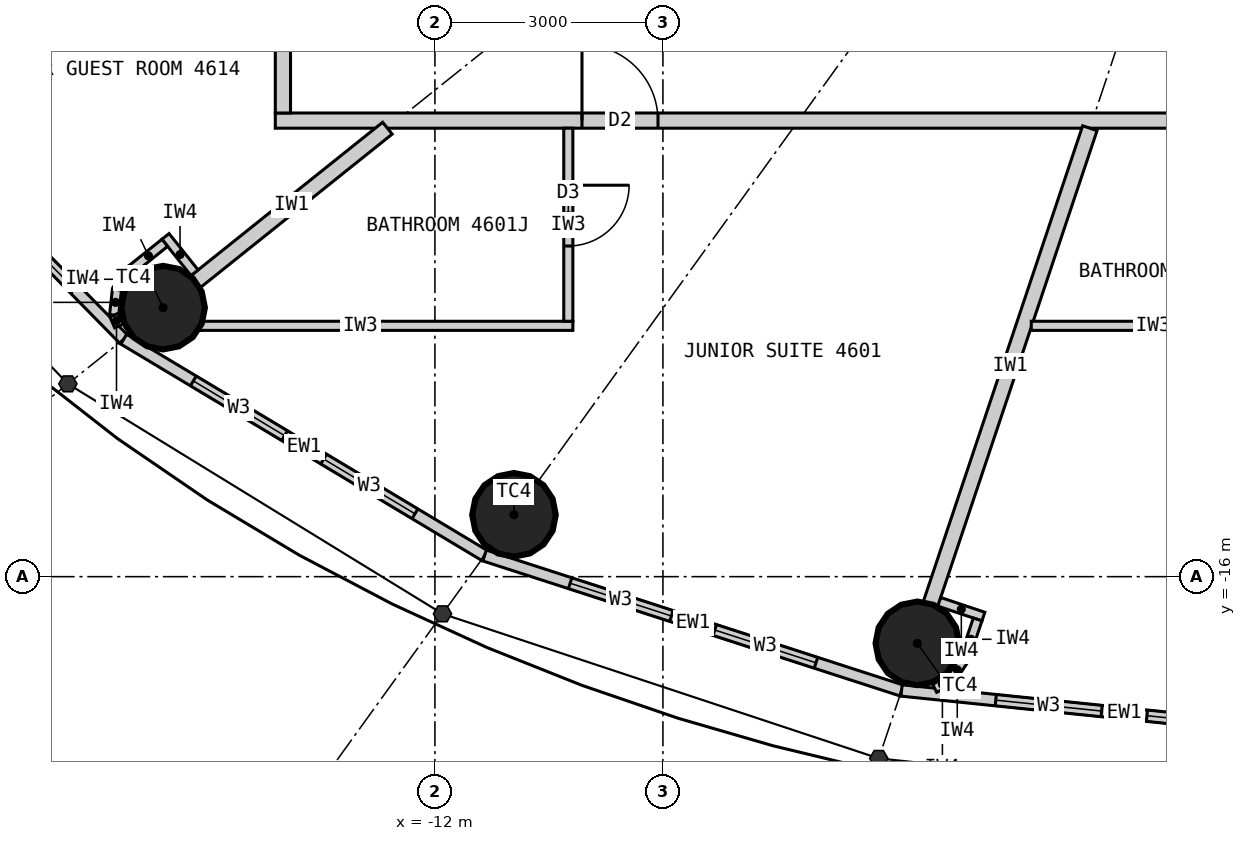
"""IFC4 building model, lengths in metres.
Left out: names, types, materials, properties, quantities, classifications, styles, units other than length and angle.
Written with IfcOpenShell. Run it as: python <this file> out.ifc"""

import sys

from ifc_helpers import new_model, si_unit, direction, frame, frame_2d, origin, origin_2d, place, context, subcontext, project, spatial, rectangle, circle, extrude, element, fill, save


model = new_model("IFC4")
c1 = context("Model", 3, precision=1e-05, world=origin(), true_north=direction((0.0, 1.0)))
c2 = subcontext(c1, "Body", "Model", "MODEL_VIEW")
j1 = project(units=[si_unit("LENGTHUNIT", "METRE"), si_unit("PLANEANGLEUNIT", "RADIAN")], contexts=[c1])
p1 = place(None, origin())
s1 = spatial("IfcSite", under=j1, at=p1, CompositionType="ELEMENT")
p2 = place(p1, origin())
s2 = spatial("IfcBuilding", under=s1, at=p2, CompositionType="ELEMENT")
p3 = place(p2, frame((0.0, 0.0, 173.1)))
s3 = spatial("IfcBuildingStorey", under=s2, at=p3, CompositionType="ELEMENT", Elevation=173.1)
for number, where, z_axis, x_axis in (
    (1, (-15.576, -12.461, 0.0), (0.0, 0.0, 1.0), (1.0, 0.0, 0.0)),
    (2, (-10.96, -15.186, 0.0), (0.0, 0.0, 1.0), (1.0, 0.0, 0.0)),
    (3, (-5.653, -16.877, 0.0), (0.0, 0.0, 1.0), (1.0, 0.0, 0.0)),
):
    element("IfcColumn", number, at=place(p3, frame(where, z_axis=z_axis, x_axis=x_axis)), inside=s3, PredefinedType="COLUMN", context=c2, shape_type="SweptSolid", body=[
        extrude(circle(Radius=0.55, at=origin_2d()), origin(), (0.0, 0.0, 1.0), 3.3),
    ])
p4 = place(p3, frame((-19.772, -9.132, 0.0), z_axis=(0.0, 0.0, 1.0), x_axis=(0.700727467776, -0.71342905457, 0.0)))
e4 = element("IfcWall", 4, at=p4, inside=s3, PredefinedType="ELEMENTEDWALL", context=c2, shape_type="SweptSolid", body=[
    extrude(rectangle(XDim=5.247, YDim=0.15, at=frame_2d((2.624, 0.0))), origin(), (0.0, 0.0, 1.0), 3.12),
])
p5 = place(p4, frame((0.924, 0.0, 0.9)))
e5 = element("IfcOpeningElement", 5, at=p5, cuts=e4, PredefinedType="OPENING", context=c2, shape_type="SweptSolid", body=[
    extrude(rectangle(XDim=1.4, YDim=1.9, at=frame_2d((0.7, 0.95))), frame((0.0, 0.085, 0.0), z_axis=(0.0, -1.0, 0.0), x_axis=(1.0, 0.0, 0.0)), (0.0, 0.0, 1.0), 0.17),
])
p6 = place(p4, frame((2.924, 0.0, 0.9)))
e6 = element("IfcOpeningElement", 6, at=p6, cuts=e4, PredefinedType="OPENING", context=c2, shape_type="SweptSolid", body=[
    extrude(rectangle(XDim=1.4, YDim=1.9, at=frame_2d((0.7, 0.95))), frame((0.0, 0.085, 0.0), z_axis=(0.0, -1.0, 0.0), x_axis=(1.0, 0.0, 0.0)), (0.0, 0.0, 1.0), 0.17),
])
p7 = place(p3, frame((-16.095, -12.876, 0.0), z_axis=(0.0, 0.0, 1.0), x_axis=(0.857695199231, -0.514158482587, 0.0)))
e7 = element("IfcWall", 7, at=p7, inside=s3, PredefinedType="ELEMENTEDWALL", context=c2, shape_type="SweptSolid", body=[
    extrude(rectangle(XDim=5.536, YDim=0.15, at=frame_2d((2.768, 0.0))), origin(), (0.0, 0.0, 1.0), 3.12),
])
p8 = place(p7, frame((1.068, 0.0, 0.9)))
e8 = element("IfcOpeningElement", 8, at=p8, cuts=e7, PredefinedType="OPENING", context=c2, shape_type="SweptSolid", body=[
    extrude(rectangle(XDim=1.4, YDim=1.9, at=frame_2d((0.7, 0.95))), frame((0.0, 0.085, 0.0), z_axis=(0.0, -1.0, 0.0), x_axis=(1.0, 0.0, 0.0)), (0.0, 0.0, 1.0), 0.17),
])
p9 = place(p7, frame((3.068, 0.0, 0.9)))
e9 = element("IfcOpeningElement", 9, at=p9, cuts=e7, PredefinedType="OPENING", context=c2, shape_type="SweptSolid", body=[
    extrude(rectangle(XDim=1.4, YDim=1.9, at=frame_2d((0.7, 0.95))), frame((0.0, 0.085, 0.0), z_axis=(0.0, -1.0, 0.0), x_axis=(1.0, 0.0, 0.0)), (0.0, 0.0, 1.0), 0.17),
])
p10 = place(p3, frame((-11.346, -15.722, 0.0), z_axis=(0.0, 0.0, 1.0), x_axis=(0.951432482129, -0.307857486429, 0.0)))
e10 = element("IfcWall", 10, at=p10, inside=s3, PredefinedType="ELEMENTEDWALL", context=c2, shape_type="SweptSolid", body=[
    extrude(rectangle(XDim=5.766, YDim=0.15, at=frame_2d((2.883, 0.0))), origin(), (0.0, 0.0, 1.0), 3.12),
])
p11 = place(p10, frame((1.183, 0.0, 0.9)))
e11 = element("IfcOpeningElement", 11, at=p11, cuts=e10, PredefinedType="OPENING", context=c2, shape_type="SweptSolid", body=[
    extrude(rectangle(XDim=1.4, YDim=1.9, at=frame_2d((0.7, 0.95))), frame((0.0, 0.085, 0.0), z_axis=(0.0, -1.0, 0.0), x_axis=(1.0, 0.0, 0.0)), (0.0, 0.0, 1.0), 0.17),
])
p12 = place(p10, frame((3.183, 0.0, 0.9)))
e12 = element("IfcOpeningElement", 12, at=p12, cuts=e10, PredefinedType="OPENING", context=c2, shape_type="SweptSolid", body=[
    extrude(rectangle(XDim=1.4, YDim=1.9, at=frame_2d((0.7, 0.95))), frame((0.0, 0.085, 0.0), z_axis=(0.0, -1.0, 0.0), x_axis=(1.0, 0.0, 0.0)), (0.0, 0.0, 1.0), 0.17),
])
p13 = place(p3, frame((-5.86, -17.497, 0.0), z_axis=(0.0, 0.0, 1.0), x_axis=(0.994751738032, -0.102318032045, 0.0)))
e13 = element("IfcWall", 13, at=p13, inside=s3, PredefinedType="ELEMENTEDWALL", context=c2, shape_type="SweptSolid", body=[
    extrude(rectangle(XDim=5.891, YDim=0.15, at=frame_2d((2.946, 0.0))), origin(), (0.0, 0.0, 1.0), 3.12),
])
p14 = place(p13, frame((1.246, 0.0, 0.9)))
e14 = element("IfcOpeningElement", 14, at=p14, cuts=e13, PredefinedType="OPENING", context=c2, shape_type="SweptSolid", body=[
    extrude(rectangle(XDim=1.4, YDim=1.9, at=frame_2d((0.7, 0.95))), frame((0.0, 0.085, 0.0), z_axis=(0.0, -1.0, 0.0), x_axis=(1.0, 0.0, 0.0)), (0.0, 0.0, 1.0), 0.17),
])
p15 = place(p13, frame((3.246, 0.0, 0.9)))
e15 = element("IfcOpeningElement", 15, at=p15, cuts=e13, PredefinedType="OPENING", context=c2, shape_type="SweptSolid", body=[
    extrude(rectangle(XDim=1.4, YDim=1.9, at=frame_2d((0.7, 0.95))), frame((0.0, 0.085, 0.0), z_axis=(0.0, -1.0, 0.0), x_axis=(1.0, 0.0, 0.0)), (0.0, 0.0, 1.0), 0.17),
])
p16 = place(p3, frame((14.1, -10.0, 0.0), z_axis=(0.0, 0.0, 1.0), x_axis=(-1.0, 0.0, 0.0)))
e16 = element("IfcWall", 16, at=p16, inside=s3, PredefinedType="PARTITIONING", context=c2, shape_type="SweptSolid", body=[
    extrude(rectangle(XDim=28.2, YDim=0.2, at=frame_2d((14.1, 0.0))), origin(), (0.0, 0.0, 1.0), 3.12),
])
p17 = place(p16, frame((23.165, 0.0, 0.0)))
e17 = element("IfcOpeningElement", 17, at=p17, cuts=e16, PredefinedType="OPENING", context=c2, shape_type="SweptSolid", body=[
    extrude(rectangle(XDim=1.0, YDim=2.2, at=frame_2d((0.5, 1.1))), frame((0.0, 0.11, 0.0), z_axis=(0.0, -1.0, 0.0), x_axis=(1.0, 0.0, 0.0)), (0.0, 0.0, 1.0), 0.22),
])
p18 = place(p16, frame((13.923, 0.0, 0.0)))
e18 = element("IfcOpeningElement", 18, at=p18, cuts=e16, PredefinedType="OPENING", context=c2, shape_type="SweptSolid", body=[
    extrude(rectangle(XDim=1.0, YDim=2.2, at=frame_2d((0.5, 1.1))), frame((0.0, 0.11, 0.0), z_axis=(0.0, -1.0, 0.0), x_axis=(1.0, 0.0, 0.0)), (0.0, 0.0, 1.0), 0.22),
])
p19 = place(p16, frame((7.957, 0.0, 0.0)))
e19 = element("IfcOpeningElement", 19, at=p19, cuts=e16, PredefinedType="OPENING", context=c2, shape_type="SweptSolid", body=[
    extrude(rectangle(XDim=1.0, YDim=2.2, at=frame_2d((0.5, 1.1))), frame((0.0, 0.11, 0.0), z_axis=(0.0, -1.0, 0.0), x_axis=(1.0, 0.0, 0.0)), (0.0, 0.0, 1.0), 0.22),
])
p20 = place(p3, frame((-12.625, -10.1, 0.0), z_axis=(0.0, 0.0, 1.0), x_axis=(-0.780876185034, -0.624685827954, 0.0)))
e20 = element("IfcWall", 20, at=p20, inside=s3, PredefinedType="PARTITIONING", context=c2, shape_type="SweptSolid", body=[
    extrude(rectangle(XDim=3.229, YDim=0.2, at=frame_2d((1.615, 0.0))), origin(), (0.0, 0.0, 1.0), 2.42),
])
p21 = place(p3, frame((-3.383, -10.1, 0.0), z_axis=(0.0, 0.0, 1.0), x_axis=(-0.317615120474, -0.948219718866, 0.0)))
e21 = element("IfcWall", 21, at=p21, inside=s3, PredefinedType="PARTITIONING", context=c2, shape_type="SweptSolid", body=[
    extrude(rectangle(XDim=6.597, YDim=0.2, at=frame_2d((3.299, 0.0))), origin(), (0.0, 0.0, 1.0), 2.42),
])
p22 = place(p3, frame((-15.775, -12.7, 0.0), z_axis=(0.0, 0.0, 1.0), x_axis=(1.0, 0.0, 0.0)))
e22 = element("IfcWall", 22, at=p22, inside=s3, PredefinedType="PARTITIONING", context=c2, shape_type="SweptSolid", body=[
    extrude(rectangle(XDim=5.59, YDim=0.12, at=frame_2d((2.795, 0.0))), origin(), (0.0, 0.0, 1.0), 3.12),
])
p23 = place(p3, frame((-10.245, -10.1, 0.0), z_axis=(0.0, 0.0, 1.0), x_axis=(0.0, -1.0, 0.0)))
e23 = element("IfcWall", 23, at=p23, inside=s3, PredefinedType="PARTITIONING", context=c2, shape_type="SweptSolid", body=[
    extrude(rectangle(XDim=2.54, YDim=0.12, at=frame_2d((1.27, 0.0))), origin(), (0.0, 0.0, 1.0), 3.12),
])
p24 = place(p23, frame((0.75, 0.0, 0.0)))
e24 = element("IfcOpeningElement", 24, at=p24, cuts=e23, PredefinedType="OPENING", context=c2, shape_type="SweptSolid", body=[
    extrude(rectangle(XDim=0.8, YDim=2.1, at=frame_2d((0.4, 1.05))), frame((0.0, 0.07, 0.0), z_axis=(0.0, -1.0, 0.0), x_axis=(1.0, 0.0, 0.0)), (0.0, 0.0, 1.0), 0.14),
])
p25 = place(p3, frame((-4.154, -12.7, 0.0), z_axis=(0.0, 0.0, 1.0), x_axis=(1.0, 0.0, 0.0)))
e25 = element("IfcWall", 25, at=p25, inside=s3, PredefinedType="PARTITIONING", context=c2, shape_type="SweptSolid", body=[
    extrude(rectangle(XDim=3.211, YDim=0.12, at=frame_2d((1.605, 0.0))), origin(), (0.0, 0.0, 1.0), 3.12),
])
p26 = place(p3, frame((-14.0, -1.67, 0.0), z_axis=(0.0, 0.0, 1.0), x_axis=(0.0, -1.0, 0.0)))
e26 = element("IfcWall", 26, at=p26, inside=s3, PredefinedType="PARTITIONING", context=c2, shape_type="SweptSolid", body=[
    extrude(rectangle(XDim=8.23, YDim=0.2, at=frame_2d((4.115, 0.0))), origin(), (0.0, 0.0, 1.0), 3.12),
])
p27 = place(p26, frame((5.552, 0.0, 0.0)))
e27 = element("IfcOpeningElement", 27, at=p27, cuts=e26, PredefinedType="OPENING", context=c2, shape_type="SweptSolid", body=[
    extrude(rectangle(XDim=1.0, YDim=2.2, at=frame_2d((0.5, 1.1))), frame((0.0, 0.11, 0.0), z_axis=(0.0, -1.0, 0.0), x_axis=(1.0, 0.0, 0.0)), (0.0, 0.0, 1.0), 0.22),
])
p28 = place(p3, frame((-15.162, -12.002, 0.0), z_axis=(0.0, 0.0, 1.0), x_axis=(-0.624597762427, 0.780946627607, 0.0)))
e28 = element("IfcWall", 28, at=p28, inside=s3, PredefinedType="PARTITIONING", context=c2, shape_type="SweptSolid", body=[
    extrude(rectangle(XDim=0.612, YDim=0.12, at=frame_2d((0.306, 0.0))), origin(), (0.0, 0.0, 1.0), 3.12),
])
p29 = place(p3, frame((-15.554, -11.608, 0.0), z_axis=(0.0, 0.0, 1.0), x_axis=(-0.780695577787, -0.624911525597, 0.0)))
e29 = element("IfcWall", 29, at=p29, inside=s3, PredefinedType="PARTITIONING", context=c2, shape_type="SweptSolid", body=[
    extrude(rectangle(XDim=0.55, YDim=0.12, at=frame_2d((0.275, 0.0))), origin(), (0.0, 0.0, 1.0), 3.12),
])
p30 = place(p3, frame((-15.984, -11.952, 0.0), z_axis=(0.0, 0.0, 1.0), x_axis=(-0.592335221171, -0.805691619517, 0.0)))
e30 = element("IfcWall", 30, at=p30, inside=s3, PredefinedType="PARTITIONING", context=c2, shape_type="SweptSolid", body=[
    extrude(rectangle(XDim=0.338, YDim=0.12, at=frame_2d((0.169, 0.0))), origin(), (0.0, 0.0, 1.0), 3.12),
])
p31 = place(p3, frame((-16.184, -12.224, 0.0), z_axis=(0.0, 0.0, 1.0), x_axis=(-0.110669692975, -0.993857242795, 0.0)))
e31 = element("IfcWall", 31, at=p31, inside=s3, PredefinedType="PARTITIONING", context=c2, shape_type="SweptSolid", body=[
    extrude(rectangle(XDim=0.337, YDim=0.12, at=frame_2d((0.169, 0.0))), origin(), (0.0, 0.0, 1.0), 3.12),
])
p32 = place(p3, frame((-16.221, -12.559, 0.0), z_axis=(0.0, 0.0, 1.0), x_axis=(0.401064416249, -0.916049853457, 0.0)))
e32 = element("IfcWall", 32, at=p32, inside=s3, PredefinedType="PARTITIONING", context=c2, shape_type="SweptSolid", body=[
    extrude(rectangle(XDim=0.156, YDim=0.12, at=frame_2d((0.078, 0.0))), origin(), (0.0, 0.0, 1.0), 3.12),
])
p33 = place(p3, frame((-5.364, -16.331, 0.0), z_axis=(0.0, 0.0, 1.0), x_axis=(0.948283770087, -0.317423835572, 0.0)))
e33 = element("IfcWall", 33, at=p33, inside=s3, PredefinedType="PARTITIONING", context=c2, shape_type="SweptSolid", body=[
    extrude(rectangle(XDim=0.612, YDim=0.12, at=frame_2d((0.306, 0.0))), origin(), (0.0, 0.0, 1.0), 3.12),
])
p34 = place(p3, frame((-4.86, -16.563, 0.0), z_axis=(0.0, 0.0, 1.0), x_axis=(-0.317825321803, -0.948149284038, 0.0)))
e34 = element("IfcWall", 34, at=p34, inside=s3, PredefinedType="PARTITIONING", context=c2, shape_type="SweptSolid", body=[
    extrude(rectangle(XDim=0.55, YDim=0.12, at=frame_2d((0.275, 0.0))), origin(), (0.0, 0.0, 1.0), 3.12),
])
p35 = place(p3, frame((-5.034, -17.084, 0.0), z_axis=(0.0, 0.0, 1.0), x_axis=(-0.552362205726, -0.833604218851, 0.0)))
e35 = element("IfcWall", 35, at=p35, inside=s3, PredefinedType="PARTITIONING", context=c2, shape_type="SweptSolid", body=[
    extrude(rectangle(XDim=0.338, YDim=0.12, at=frame_2d((0.169, 0.0))), origin(), (0.0, 0.0, 1.0), 3.12),
])
p36 = place(p3, frame((-5.221, -17.366, 0.0), z_axis=(0.0, 0.0, 1.0), x_axis=(-0.895067896179, -0.445929883759, 0.0)))
e36 = element("IfcWall", 36, at=p36, inside=s3, PredefinedType="PARTITIONING", context=c2, shape_type="SweptSolid", body=[
    extrude(rectangle(XDim=0.228, YDim=0.12, at=frame_2d((0.114, 0.0))), origin(), (0.0, 0.0, 1.0), 3.12),
])
p37 = place(p6, origin())
e37 = element("IfcWindow", 37, at=p37, inside=s3, PartitioningType="SINGLE_PANEL", PredefinedType="WINDOW", context=c2, shape_type="SweptSolid", body=[
    extrude(rectangle(XDim=1.4, YDim=1.9, at=frame_2d((0.7, 0.95))), frame((0.0, 0.03, 0.0), z_axis=(0.0, -1.0, 0.0), x_axis=(1.0, 0.0, 0.0)), (0.0, 0.0, 1.0), 0.06),
])
fill(e6, e37)
p38 = place(p8, origin())
e38 = element("IfcWindow", 38, at=p38, inside=s3, PartitioningType="SINGLE_PANEL", PredefinedType="WINDOW", context=c2, shape_type="SweptSolid", body=[
    extrude(rectangle(XDim=1.4, YDim=1.9, at=frame_2d((0.7, 0.95))), frame((0.0, 0.03, 0.0), z_axis=(0.0, -1.0, 0.0), x_axis=(1.0, 0.0, 0.0)), (0.0, 0.0, 1.0), 0.06),
])
fill(e8, e38)
p39 = place(p9, origin())
e39 = element("IfcWindow", 39, at=p39, inside=s3, PartitioningType="SINGLE_PANEL", PredefinedType="WINDOW", context=c2, shape_type="SweptSolid", body=[
    extrude(rectangle(XDim=1.4, YDim=1.9, at=frame_2d((0.7, 0.95))), frame((0.0, 0.03, 0.0), z_axis=(0.0, -1.0, 0.0), x_axis=(1.0, 0.0, 0.0)), (0.0, 0.0, 1.0), 0.06),
])
fill(e9, e39)
p40 = place(p11, origin())
e40 = element("IfcWindow", 40, at=p40, inside=s3, PartitioningType="SINGLE_PANEL", PredefinedType="WINDOW", context=c2, shape_type="SweptSolid", body=[
    extrude(rectangle(XDim=1.4, YDim=1.9, at=frame_2d((0.7, 0.95))), frame((0.0, 0.03, 0.0), z_axis=(0.0, -1.0, 0.0), x_axis=(1.0, 0.0, 0.0)), (0.0, 0.0, 1.0), 0.06),
])
fill(e11, e40)
p41 = place(p12, origin())
e41 = element("IfcWindow", 41, at=p41, inside=s3, PartitioningType="SINGLE_PANEL", PredefinedType="WINDOW", context=c2, shape_type="SweptSolid", body=[
    extrude(rectangle(XDim=1.4, YDim=1.9, at=frame_2d((0.7, 0.95))), frame((0.0, 0.03, 0.0), z_axis=(0.0, -1.0, 0.0), x_axis=(1.0, 0.0, 0.0)), (0.0, 0.0, 1.0), 0.06),
])
fill(e12, e41)
p42 = place(p14, origin())
e42 = element("IfcWindow", 42, at=p42, inside=s3, PartitioningType="SINGLE_PANEL", PredefinedType="WINDOW", context=c2, shape_type="SweptSolid", body=[
    extrude(rectangle(XDim=1.4, YDim=1.9, at=frame_2d((0.7, 0.95))), frame((0.0, 0.03, 0.0), z_axis=(0.0, -1.0, 0.0), x_axis=(1.0, 0.0, 0.0)), (0.0, 0.0, 1.0), 0.06),
])
fill(e14, e42)
p43 = place(p15, origin())
e43 = element("IfcWindow", 43, at=p43, inside=s3, PartitioningType="SINGLE_PANEL", PredefinedType="WINDOW", context=c2, shape_type="SweptSolid", body=[
    extrude(rectangle(XDim=1.4, YDim=1.9, at=frame_2d((0.7, 0.95))), frame((0.0, 0.03, 0.0), z_axis=(0.0, -1.0, 0.0), x_axis=(1.0, 0.0, 0.0)), (0.0, 0.0, 1.0), 0.06),
])
fill(e15, e43)
p44 = place(p24, origin())
e44 = element("IfcDoor", 44, at=p44, inside=s3, OperationType="SINGLE_SWING_LEFT", PredefinedType="DOOR", context=c2, shape_type="SweptSolid", body=[
    extrude(rectangle(XDim=0.8, YDim=2.1, at=frame_2d((0.4, 1.05))), frame((0.0, 0.025, 0.0), z_axis=(0.0, -1.0, 0.0), x_axis=(1.0, 0.0, 0.0)), (0.0, 0.0, 1.0), 0.05),
])
fill(e24, e44)
p45 = place(p17, origin())
e45 = element("IfcDoor", 45, at=p45, inside=s3, OperationType="SINGLE_SWING_RIGHT", PredefinedType="DOOR", context=c2, shape_type="SweptSolid", body=[
    extrude(rectangle(XDim=1.0, YDim=2.2, at=frame_2d((0.5, 1.1))), frame((0.0, 0.025, 0.0), z_axis=(0.0, -1.0, 0.0), x_axis=(1.0, 0.0, 0.0)), (0.0, 0.0, 1.0), 0.05),
])
fill(e17, e45)
save(model, sys.argv[1])
